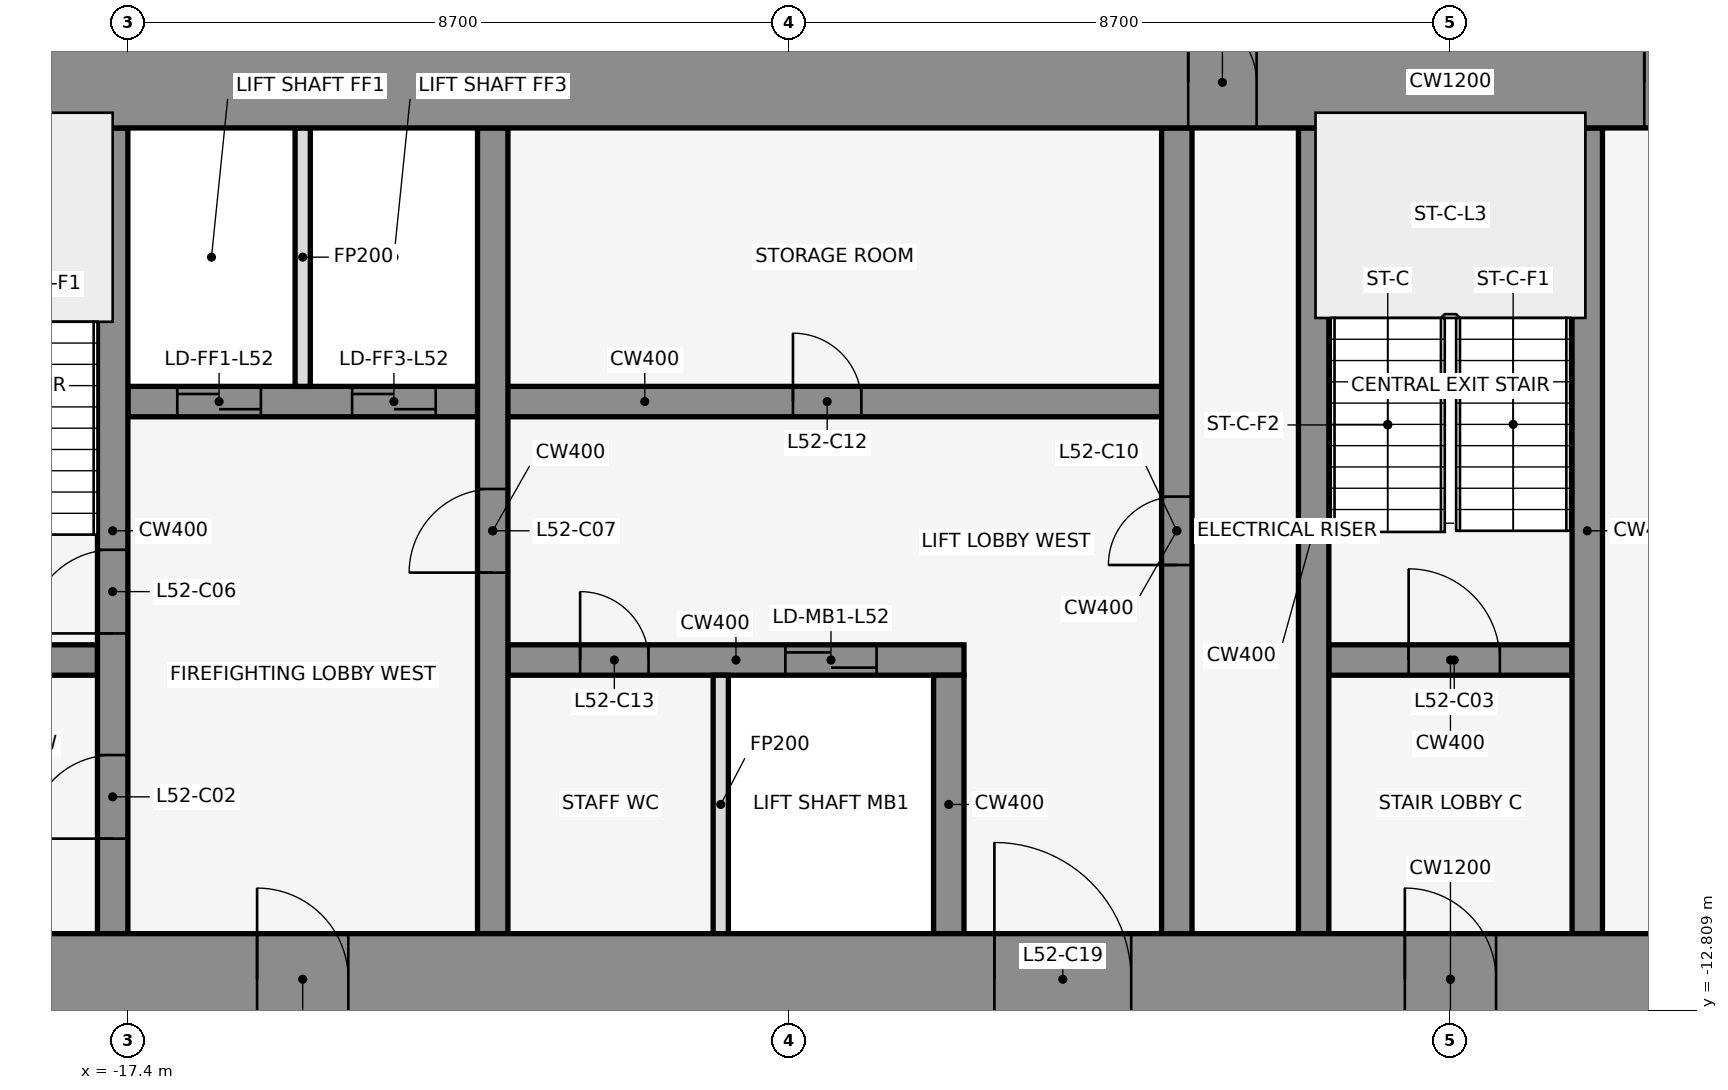
"""IFC4 building model, lengths in metres.
Left out: names, types, materials, properties, quantities, classifications, styles, units other than length and angle.
Written with IfcOpenShell. Run it as: python <this file> out.ifc"""

import sys

from ifc_helpers import new_model, si_unit, direction, frame, frame_2d, origin, place, context, subcontext, project, spatial, rectangle, extrude, element, fill, save


model = new_model("IFC4")
c1 = context("Model", 3, precision=1e-05, world=origin(), true_north=direction((0.0, 1.0)))
c2 = subcontext(c1, "Body", "Model", "MODEL_VIEW")
j1 = project(units=[si_unit("LENGTHUNIT", "METRE"), si_unit("PLANEANGLEUNIT", "RADIAN")], contexts=[c1])
p1 = place(None, origin())
s1 = spatial("IfcSite", under=j1, at=p1, CompositionType="ELEMENT")
p2 = place(p1, origin())
s2 = spatial("IfcBuilding", under=s1, at=p2, CompositionType="ELEMENT")
p3 = place(p2, frame((0.0, 0.0, 231.9)))
s3 = spatial("IfcBuildingStorey", under=s2, at=p3, CompositionType="ELEMENT", Elevation=231.9)
for number, where, z_axis, x_axis in (
    (1, (1.901, 1.08, 0.0), (0.0, 0.0, 1.0), (-0.84, -0.543, 0.0)),
    (2, (-0.068, -0.105, 0.0), (0.0, 0.0, 1.0), (-0.84, 0.543, 0.0)),
    (3, (-14.599, 1.08, 0.0), (0.0, 0.0, 1.0), (-0.84, -0.543, 0.0)),
):
    element("IfcWall", number, at=place(p3, frame(where, z_axis=z_axis, x_axis=x_axis)), inside=s3, PredefinedType="STANDARD", context=c2, shape_type="SweptSolid", body=[
        extrude(rectangle(XDim=2.183, YDim=0.25, at=frame_2d((1.091, 0.0))), origin(), (0.0, 0.0, 1.0), 3.9),
    ])
p4 = place(p3, frame((-20.8, -8.2, 0.0), z_axis=(0.0, 0.0, 1.0), x_axis=(1.0, 0.0, 0.0)))
e4 = element("IfcWall", 4, at=p4, inside=s3, PredefinedType="SHEAR", context=c2, shape_type="SweptSolid", body=[
    extrude(rectangle(XDim=3.0, YDim=0.4, at=frame_2d((1.5, 0.0))), origin(), (0.0, 0.0, 1.0), 4.1),
])
p5 = place(p4, frame((0.85, 0.0, 0.0)))
e5 = element("IfcOpeningElement", 5, at=p5, cuts=e4, PredefinedType="OPENING", context=c2, shape_type="SweptSolid", body=[
    extrude(rectangle(XDim=1.2, YDim=2.1, at=frame_2d((0.6, 1.05))), frame((0.0, 0.212, 0.0), z_axis=(0.0, -1.0, 0.0), x_axis=(1.0, 0.0, 0.0)), (0.0, 0.0, 1.0), 0.424),
])
p6 = place(p3, frame((-12.4, -8.2, 0.0), z_axis=(0.0, 0.0, 1.0), x_axis=(1.0, 0.0, 0.0)))
e6 = element("IfcWall", 6, at=p6, inside=s3, PredefinedType="SHEAR", context=c2, shape_type="SweptSolid", body=[
    extrude(rectangle(XDim=6.0, YDim=0.4, at=frame_2d((3.0, 0.0))), origin(), (0.0, 0.0, 1.0), 4.1),
])
p7 = place(p6, frame((3.65, 0.0, 0.0)))
e7 = element("IfcOpeningElement", 7, at=p7, cuts=e6, PredefinedType="OPENING", context=c2, shape_type="SweptSolid", body=[
    extrude(rectangle(XDim=1.2, YDim=2.1, at=frame_2d((0.6, 1.05))), frame((0.0, 0.212, 0.0), z_axis=(0.0, -1.0, 0.0), x_axis=(1.0, 0.0, 0.0)), (0.0, 0.0, 1.0), 0.424),
])
p8 = place(p6, frame((0.95, 0.0, 0.0)))
e8 = element("IfcOpeningElement", 8, at=p8, cuts=e6, PredefinedType="OPENING", context=c2, shape_type="SweptSolid", body=[
    extrude(rectangle(XDim=0.9, YDim=2.1, at=frame_2d((0.45, 1.05))), frame((0.0, 0.212, 0.0), z_axis=(0.0, -1.0, 0.0), x_axis=(1.0, 0.0, 0.0)), (0.0, 0.0, 1.0), 0.424),
])
p9 = place(p3, frame((-1.6, -8.2, 0.0), z_axis=(0.0, 0.0, 1.0), x_axis=(1.0, 0.0, 0.0)))
e9 = element("IfcWall", 9, at=p9, inside=s3, PredefinedType="SHEAR", context=c2, shape_type="SweptSolid", body=[
    extrude(rectangle(XDim=3.2, YDim=0.4, at=frame_2d((1.6, 0.0))), origin(), (0.0, 0.0, 1.0), 4.1),
])
p10 = place(p9, frame((1.05, 0.0, 0.0)))
e10 = element("IfcOpeningElement", 10, at=p10, cuts=e9, PredefinedType="OPENING", context=c2, shape_type="SweptSolid", body=[
    extrude(rectangle(XDim=1.2, YDim=2.1, at=frame_2d((0.6, 1.05))), frame((0.0, 0.212, 0.0), z_axis=(0.0, -1.0, 0.0), x_axis=(1.0, 0.0, 0.0)), (0.0, 0.0, 1.0), 0.424),
])
p11 = place(p3, frame((-17.4, -4.8, 0.0), z_axis=(0.0, 0.0, 1.0), x_axis=(1.0, 0.0, 0.0)))
e11 = element("IfcWall", 11, at=p11, inside=s3, PredefinedType="SHEAR", context=c2, shape_type="SweptSolid", body=[
    extrude(rectangle(XDim=13.6, YDim=0.4, at=frame_2d((6.8, 0.0))), origin(), (0.0, 0.0, 1.0), 4.1),
])
p12 = place(p11, frame((0.65, 0.0, 0.0)))
e12 = element("IfcOpeningElement", 12, at=p12, cuts=e11, PredefinedType="OPENING", context=c2, shape_type="SweptSolid", body=[
    extrude(rectangle(XDim=1.1, YDim=2.1, at=frame_2d((0.55, 1.05))), frame((0.0, 0.212, 0.0), z_axis=(0.0, -1.0, 0.0), x_axis=(1.0, 0.0, 0.0)), (0.0, 0.0, 1.0), 0.424),
])
p13 = place(p11, frame((2.95, 0.0, 0.0)))
e13 = element("IfcOpeningElement", 13, at=p13, cuts=e11, PredefinedType="OPENING", context=c2, shape_type="SweptSolid", body=[
    extrude(rectangle(XDim=1.1, YDim=2.1, at=frame_2d((0.55, 1.05))), frame((0.0, 0.212, 0.0), z_axis=(0.0, -1.0, 0.0), x_axis=(1.0, 0.0, 0.0)), (0.0, 0.0, 1.0), 0.424),
])
p14 = place(p11, frame((8.75, 0.0, 0.0)))
e14 = element("IfcOpeningElement", 14, at=p14, cuts=e11, PredefinedType="OPENING", context=c2, shape_type="SweptSolid", body=[
    extrude(rectangle(XDim=0.9, YDim=2.1, at=frame_2d((0.45, 1.05))), frame((0.0, 0.212, 0.0), z_axis=(0.0, -1.0, 0.0), x_axis=(1.0, 0.0, 0.0)), (0.0, 0.0, 1.0), 0.424),
])
p15 = place(p3, frame((-17.6, -11.8, 0.0), z_axis=(0.0, 0.0, 1.0), x_axis=(0.0, 1.0, 0.0)))
e15 = element("IfcWall", 15, at=p15, inside=s3, PredefinedType="SHEAR", context=c2, shape_type="SweptSolid", body=[
    extrude(rectangle(XDim=10.6, YDim=0.4, at=frame_2d((5.3, 0.0))), origin(), (0.0, 0.0, 1.0), 4.1),
])
p16 = place(p15, frame((1.25, 0.0, 0.0)))
e16 = element("IfcOpeningElement", 16, at=p16, cuts=e15, PredefinedType="OPENING", context=c2, shape_type="SweptSolid", body=[
    extrude(rectangle(XDim=1.1, YDim=2.1, at=frame_2d((0.55, 1.05))), frame((0.0, 0.212, 0.0), z_axis=(0.0, -1.0, 0.0), x_axis=(1.0, 0.0, 0.0)), (0.0, 0.0, 1.0), 0.424),
])
p17 = place(p15, frame((3.95, 0.0, 0.0)))
e17 = element("IfcOpeningElement", 17, at=p17, cuts=e15, PredefinedType="OPENING", context=c2, shape_type="SweptSolid", body=[
    extrude(rectangle(XDim=1.1, YDim=2.1, at=frame_2d((0.55, 1.05))), frame((0.0, 0.212, 0.0), z_axis=(0.0, -1.0, 0.0), x_axis=(1.0, 0.0, 0.0)), (0.0, 0.0, 1.0), 0.424),
])
p18 = place(p3, frame((-15.1, -4.6, 0.0), z_axis=(0.0, 0.0, 1.0), x_axis=(0.0, 1.0, 0.0)))
e18 = element("IfcWall", 18, at=p18, inside=s3, PredefinedType="PARTITIONING", context=c2, shape_type="SweptSolid", body=[
    extrude(rectangle(XDim=3.4, YDim=0.2, at=frame_2d((1.7, 0.0))), origin(), (0.0, 0.0, 1.0), 2.79),
])
p19 = place(p3, frame((-12.6, -11.8, 0.0), z_axis=(0.0, 0.0, 1.0), x_axis=(0.0, 1.0, 0.0)))
e19 = element("IfcWall", 19, at=p19, inside=s3, PredefinedType="SHEAR", context=c2, shape_type="SweptSolid", body=[
    extrude(rectangle(XDim=10.6, YDim=0.4, at=frame_2d((5.3, 0.0))), origin(), (0.0, 0.0, 1.0), 4.1),
])
p20 = place(p19, frame((4.75, 0.0, 0.0)))
e20 = element("IfcOpeningElement", 20, at=p20, cuts=e19, PredefinedType="OPENING", context=c2, shape_type="SweptSolid", body=[
    extrude(rectangle(XDim=1.1, YDim=2.1, at=frame_2d((0.55, 1.05))), frame((0.0, 0.212, 0.0), z_axis=(0.0, -1.0, 0.0), x_axis=(1.0, 0.0, 0.0)), (0.0, 0.0, 1.0), 0.424),
])
p21 = place(p3, frame((-9.6, -11.8, 0.0), z_axis=(0.0, 0.0, 1.0), x_axis=(0.0, 1.0, 0.0)))
e21 = element("IfcWall", 21, at=p21, inside=s3, PredefinedType="PARTITIONING", context=c2, shape_type="SweptSolid", body=[
    extrude(rectangle(XDim=3.4, YDim=0.2, at=frame_2d((1.7, 0.0))), origin(), (0.0, 0.0, 1.0), 2.79),
])
p22 = place(p3, frame((-6.6, -11.8, 0.0), z_axis=(0.0, 0.0, 1.0), x_axis=(0.0, 1.0, 0.0)))
e22 = element("IfcWall", 22, at=p22, inside=s3, PredefinedType="SHEAR", context=c2, shape_type="SweptSolid", body=[
    extrude(rectangle(XDim=3.4, YDim=0.4, at=frame_2d((1.7, 0.0))), origin(), (0.0, 0.0, 1.0), 4.1),
])
p23 = place(p3, frame((-3.6, -11.8, 0.0), z_axis=(0.0, 0.0, 1.0), x_axis=(0.0, 1.0, 0.0)))
e23 = element("IfcWall", 23, at=p23, inside=s3, PredefinedType="SHEAR", context=c2, shape_type="SweptSolid", body=[
    extrude(rectangle(XDim=10.6, YDim=0.4, at=frame_2d((5.3, 0.0))), origin(), (0.0, 0.0, 1.0), 4.1),
])
p24 = place(p23, frame((4.85, 0.0, 0.0)))
e24 = element("IfcOpeningElement", 24, at=p24, cuts=e23, PredefinedType="OPENING", context=c2, shape_type="SweptSolid", body=[
    extrude(rectangle(XDim=0.9, YDim=2.1, at=frame_2d((0.45, 1.05))), frame((0.0, 0.212, 0.0), z_axis=(0.0, -1.0, 0.0), x_axis=(1.0, 0.0, 0.0)), (0.0, 0.0, 1.0), 0.424),
])
for number, where, z_axis, x_axis in (
    (25, (-1.8, -11.8, 0.0), (0.0, 0.0, 1.0), (0.0, 1.0, 0.0)),
    (26, (1.8, -11.8, 0.0), (0.0, 0.0, 1.0), (0.0, 1.0, 0.0)),
):
    element("IfcWall", number, at=place(p3, frame(where, z_axis=z_axis, x_axis=x_axis)), inside=s3, PredefinedType="SHEAR", context=c2, shape_type="SweptSolid", body=[
        extrude(rectangle(XDim=10.6, YDim=0.4, at=frame_2d((5.3, 0.0))), origin(), (0.0, 0.0, 1.0), 4.1),
    ])
p25 = place(p3, frame((-22.0, -0.6, 0.0), z_axis=(0.0, 0.0, 1.0), x_axis=(1.0, 0.0, 0.0)))
e27 = element("IfcWall", 27, at=p25, inside=s3, PredefinedType="SHEAR", context=c2, shape_type="SweptSolid", body=[
    extrude(rectangle(XDim=44.0, YDim=1.2, at=frame_2d((22.0, 0.0))), origin(), (0.0, 0.0, 1.0), 4.1),
])
p26 = place(p25, frame((18.55, 0.0, 0.0)))
e28 = element("IfcOpeningElement", 28, at=p26, cuts=e27, PredefinedType="OPENING", context=c2, shape_type="SweptSolid", body=[
    extrude(rectangle(XDim=0.9, YDim=2.1, at=frame_2d((0.45, 1.05))), frame((0.0, 0.612, 0.0), z_axis=(0.0, -1.0, 0.0), x_axis=(1.0, 0.0, 0.0)), (0.0, 0.0, 1.0), 1.224),
])
p27 = place(p25, frame((24.55, 0.0, 0.0)))
e29 = element("IfcOpeningElement", 29, at=p27, cuts=e27, PredefinedType="OPENING", context=c2, shape_type="SweptSolid", body=[
    extrude(rectangle(XDim=0.9, YDim=2.1, at=frame_2d((0.45, 1.05))), frame((0.0, 0.612, 0.0), z_axis=(0.0, -1.0, 0.0), x_axis=(1.0, 0.0, 0.0)), (0.0, 0.0, 1.0), 1.224),
])
p28 = place(p3, frame((-22.0, -12.4, 0.0), z_axis=(0.0, 0.0, 1.0), x_axis=(1.0, 0.0, 0.0)))
e30 = element("IfcWall", 30, at=p28, inside=s3, PredefinedType="SHEAR", context=c2, shape_type="SweptSolid", body=[
    extrude(rectangle(XDim=44.0, YDim=1.2, at=frame_2d((22.0, 0.0))), origin(), (0.0, 0.0, 1.0), 4.1),
])
p29 = place(p28, frame((2.2, 0.0, 0.0)))
e31 = element("IfcOpeningElement", 31, at=p29, cuts=e30, PredefinedType="OPENING", context=c2, shape_type="SweptSolid", body=[
    extrude(rectangle(XDim=1.2, YDim=2.1, at=frame_2d((0.6, 1.05))), frame((0.0, 0.612, 0.0), z_axis=(0.0, -1.0, 0.0), x_axis=(1.0, 0.0, 0.0)), (0.0, 0.0, 1.0), 1.224),
])
p30 = place(p28, frame((21.4, 0.0, 0.0)))
e32 = element("IfcOpeningElement", 32, at=p30, cuts=e30, PredefinedType="OPENING", context=c2, shape_type="SweptSolid", body=[
    extrude(rectangle(XDim=1.2, YDim=2.1, at=frame_2d((0.6, 1.05))), frame((0.0, 0.612, 0.0), z_axis=(0.0, -1.0, 0.0), x_axis=(1.0, 0.0, 0.0)), (0.0, 0.0, 1.0), 1.224),
])
p31 = place(p28, frame((40.6, 0.0, 0.0)))
e33 = element("IfcOpeningElement", 33, at=p31, cuts=e30, PredefinedType="OPENING", context=c2, shape_type="SweptSolid", body=[
    extrude(rectangle(XDim=1.2, YDim=2.1, at=frame_2d((0.6, 1.05))), frame((0.0, 0.612, 0.0), z_axis=(0.0, -1.0, 0.0), x_axis=(1.0, 0.0, 0.0)), (0.0, 0.0, 1.0), 1.224),
])
p32 = place(p28, frame((16.0, 0.0, 0.0)))
e34 = element("IfcOpeningElement", 34, at=p32, cuts=e30, PredefinedType="OPENING", context=c2, shape_type="SweptSolid", body=[
    extrude(rectangle(XDim=1.8, YDim=2.1, at=frame_2d((0.9, 1.05))), frame((0.0, 0.612, 0.0), z_axis=(0.0, -1.0, 0.0), x_axis=(1.0, 0.0, 0.0)), (0.0, 0.0, 1.0), 1.224),
])
p33 = place(p28, frame((6.3, 0.0, 0.0)))
e35 = element("IfcOpeningElement", 35, at=p33, cuts=e30, PredefinedType="OPENING", context=c2, shape_type="SweptSolid", body=[
    extrude(rectangle(XDim=1.2, YDim=2.1, at=frame_2d((0.6, 1.05))), frame((0.0, 0.612, 0.0), z_axis=(0.0, -1.0, 0.0), x_axis=(1.0, 0.0, 0.0)), (0.0, 0.0, 1.0), 1.224),
])
p34 = place(p28, frame((26.2, 0.0, 0.0)))
e36 = element("IfcOpeningElement", 36, at=p34, cuts=e30, PredefinedType="OPENING", context=c2, shape_type="SweptSolid", body=[
    extrude(rectangle(XDim=1.8, YDim=2.1, at=frame_2d((0.9, 1.05))), frame((0.0, 0.612, 0.0), z_axis=(0.0, -1.0, 0.0), x_axis=(1.0, 0.0, 0.0)), (0.0, 0.0, 1.0), 1.224),
])
p35 = place(p28, frame((36.5, 0.0, 0.0)))
e37 = element("IfcOpeningElement", 37, at=p35, cuts=e30, PredefinedType="OPENING", context=c2, shape_type="SweptSolid", body=[
    extrude(rectangle(XDim=1.2, YDim=2.1, at=frame_2d((0.6, 1.05))), frame((0.0, 0.612, 0.0), z_axis=(0.0, -1.0, 0.0), x_axis=(1.0, 0.0, 0.0)), (0.0, 0.0, 1.0), 1.224),
])
p36 = place(p16, frame((1.1, 0.0, 0.0), z_axis=(0.0, 0.0, 1.0), x_axis=(-1.0, 0.0, 0.0)))
e38 = element("IfcDoor", 38, at=p36, inside=s3, OperationType="SINGLE_SWING_LEFT", PredefinedType="DOOR", context=c2, shape_type="SweptSolid", body=[
    extrude(rectangle(XDim=1.1, YDim=2.1, at=frame_2d((0.55, 1.05))), frame((0.0, 0.025, 0.0), z_axis=(0.0, -1.0, 0.0), x_axis=(1.0, 0.0, 0.0)), (0.0, 0.0, 1.0), 0.05),
])
fill(e16, e38)
p37 = place(p10, origin())
e39 = element("IfcDoor", 39, at=p37, inside=s3, OperationType="SINGLE_SWING_LEFT", PredefinedType="DOOR", context=c2, shape_type="SweptSolid", body=[
    extrude(rectangle(XDim=1.2, YDim=2.1, at=frame_2d((0.6, 1.05))), frame((0.0, 0.025, 0.0), z_axis=(0.0, -1.0, 0.0), x_axis=(1.0, 0.0, 0.0)), (0.0, 0.0, 1.0), 0.05),
])
fill(e10, e39)
p38 = place(p12, origin())
e40 = element("IfcDoor", 40, at=p38, inside=s3, OperationType="DOUBLE_DOOR_SLIDING", PredefinedType="DOOR", context=c2, shape_type="SweptSolid", body=[
    extrude(rectangle(XDim=1.1, YDim=2.1, at=frame_2d((0.55, 1.05))), frame((0.0, 0.025, 0.0), z_axis=(0.0, -1.0, 0.0), x_axis=(1.0, 0.0, 0.0)), (0.0, 0.0, 1.0), 0.05),
])
fill(e12, e40)
p39 = place(p13, origin())
e41 = element("IfcDoor", 41, at=p39, inside=s3, OperationType="DOUBLE_DOOR_SLIDING", PredefinedType="DOOR", context=c2, shape_type="SweptSolid", body=[
    extrude(rectangle(XDim=1.1, YDim=2.1, at=frame_2d((0.55, 1.05))), frame((0.0, 0.025, 0.0), z_axis=(0.0, -1.0, 0.0), x_axis=(1.0, 0.0, 0.0)), (0.0, 0.0, 1.0), 0.05),
])
fill(e13, e41)
p40 = place(p7, origin())
e42 = element("IfcDoor", 42, at=p40, inside=s3, OperationType="DOUBLE_DOOR_SLIDING", PredefinedType="DOOR", context=c2, shape_type="SweptSolid", body=[
    extrude(rectangle(XDim=1.2, YDim=2.1, at=frame_2d((0.6, 1.05))), frame((0.0, 0.025, 0.0), z_axis=(0.0, -1.0, 0.0), x_axis=(1.0, 0.0, 0.0)), (0.0, 0.0, 1.0), 0.05),
])
fill(e7, e42)
p41 = place(p17, frame((1.1, 0.0, 0.0), z_axis=(0.0, 0.0, 1.0), x_axis=(-1.0, 0.0, 0.0)))
e43 = element("IfcDoor", 43, at=p41, inside=s3, OperationType="SINGLE_SWING_LEFT", PredefinedType="DOOR", context=c2, shape_type="SweptSolid", body=[
    extrude(rectangle(XDim=1.1, YDim=2.1, at=frame_2d((0.55, 1.05))), frame((0.0, 0.025, 0.0), z_axis=(0.0, -1.0, 0.0), x_axis=(1.0, 0.0, 0.0)), (0.0, 0.0, 1.0), 0.05),
])
fill(e17, e43)
p42 = place(p20, origin())
e44 = element("IfcDoor", 44, at=p42, inside=s3, OperationType="SINGLE_SWING_LEFT", PredefinedType="DOOR", context=c2, shape_type="SweptSolid", body=[
    extrude(rectangle(XDim=1.1, YDim=2.1, at=frame_2d((0.55, 1.05))), frame((0.0, 0.025, 0.0), z_axis=(0.0, -1.0, 0.0), x_axis=(1.0, 0.0, 0.0)), (0.0, 0.0, 1.0), 0.05),
])
fill(e20, e44)
p43 = place(p24, frame((0.9, 0.0, 0.0), z_axis=(0.0, 0.0, 1.0), x_axis=(-1.0, 0.0, 0.0)))
e45 = element("IfcDoor", 45, at=p43, inside=s3, OperationType="SINGLE_SWING_LEFT", PredefinedType="DOOR", context=c2, shape_type="SweptSolid", body=[
    extrude(rectangle(XDim=0.9, YDim=2.1, at=frame_2d((0.45, 1.05))), frame((0.0, 0.025, 0.0), z_axis=(0.0, -1.0, 0.0), x_axis=(1.0, 0.0, 0.0)), (0.0, 0.0, 1.0), 0.05),
])
fill(e24, e45)
p44 = place(p14, origin())
e46 = element("IfcDoor", 46, at=p44, inside=s3, OperationType="SINGLE_SWING_RIGHT", PredefinedType="DOOR", context=c2, shape_type="SweptSolid", body=[
    extrude(rectangle(XDim=0.9, YDim=2.1, at=frame_2d((0.45, 1.05))), frame((0.0, 0.025, 0.0), z_axis=(0.0, -1.0, 0.0), x_axis=(1.0, 0.0, 0.0)), (0.0, 0.0, 1.0), 0.05),
])
fill(e14, e46)
p45 = place(p8, frame((0.9, 0.0, 0.0), z_axis=(0.0, 0.0, 1.0), x_axis=(-1.0, 0.0, 0.0)))
e47 = element("IfcDoor", 47, at=p45, inside=s3, OperationType="SINGLE_SWING_RIGHT", PredefinedType="DOOR", context=c2, shape_type="SweptSolid", body=[
    extrude(rectangle(XDim=0.9, YDim=2.1, at=frame_2d((0.45, 1.05))), frame((0.0, 0.025, 0.0), z_axis=(0.0, -1.0, 0.0), x_axis=(1.0, 0.0, 0.0)), (0.0, 0.0, 1.0), 0.05),
])
fill(e8, e47)
p46 = place(p26, origin())
e48 = element("IfcDoor", 48, at=p46, inside=s3, OperationType="SINGLE_SWING_LEFT", PredefinedType="DOOR", context=c2, shape_type="SweptSolid", body=[
    extrude(rectangle(XDim=0.9, YDim=2.1, at=frame_2d((0.45, 1.05))), frame((0.0, 0.025, 0.0), z_axis=(0.0, -1.0, 0.0), x_axis=(1.0, 0.0, 0.0)), (0.0, 0.0, 1.0), 0.05),
])
fill(e28, e48)
p47 = place(p27, origin())
e49 = element("IfcDoor", 49, at=p47, inside=s3, OperationType="SINGLE_SWING_LEFT", PredefinedType="DOOR", context=c2, shape_type="SweptSolid", body=[
    extrude(rectangle(XDim=0.9, YDim=2.1, at=frame_2d((0.45, 1.05))), frame((0.0, 0.025, 0.0), z_axis=(0.0, -1.0, 0.0), x_axis=(1.0, 0.0, 0.0)), (0.0, 0.0, 1.0), 0.05),
])
fill(e29, e49)
p48 = place(p30, frame((1.2, 0.0, 0.0), z_axis=(0.0, 0.0, 1.0), x_axis=(-1.0, 0.0, 0.0)))
e50 = element("IfcDoor", 50, at=p48, inside=s3, OperationType="SINGLE_SWING_RIGHT", PredefinedType="DOOR", context=c2, shape_type="SweptSolid", body=[
    extrude(rectangle(XDim=1.2, YDim=2.1, at=frame_2d((0.6, 1.05))), frame((0.0, 0.025, 0.0), z_axis=(0.0, -1.0, 0.0), x_axis=(1.0, 0.0, 0.0)), (0.0, 0.0, 1.0), 0.05),
])
fill(e32, e50)
p49 = place(p32, origin())
e51 = element("IfcDoor", 51, at=p49, inside=s3, OperationType="SINGLE_SWING_LEFT", PredefinedType="DOOR", context=c2, shape_type="SweptSolid", body=[
    extrude(rectangle(XDim=1.8, YDim=2.1, at=frame_2d((0.9, 1.05))), frame((0.0, 0.025, 0.0), z_axis=(0.0, -1.0, 0.0), x_axis=(1.0, 0.0, 0.0)), (0.0, 0.0, 1.0), 0.05),
])
fill(e34, e51)
p50 = place(p33, frame((1.2, 0.0, 0.0), z_axis=(0.0, 0.0, 1.0), x_axis=(-1.0, 0.0, 0.0)))
e52 = element("IfcDoor", 52, at=p50, inside=s3, OperationType="SINGLE_SWING_RIGHT", PredefinedType="DOOR", context=c2, shape_type="SweptSolid", body=[
    extrude(rectangle(XDim=1.2, YDim=2.1, at=frame_2d((0.6, 1.05))), frame((0.0, 0.025, 0.0), z_axis=(0.0, -1.0, 0.0), x_axis=(1.0, 0.0, 0.0)), (0.0, 0.0, 1.0), 0.05),
])
fill(e35, e52)
save(model, sys.argv[1])
